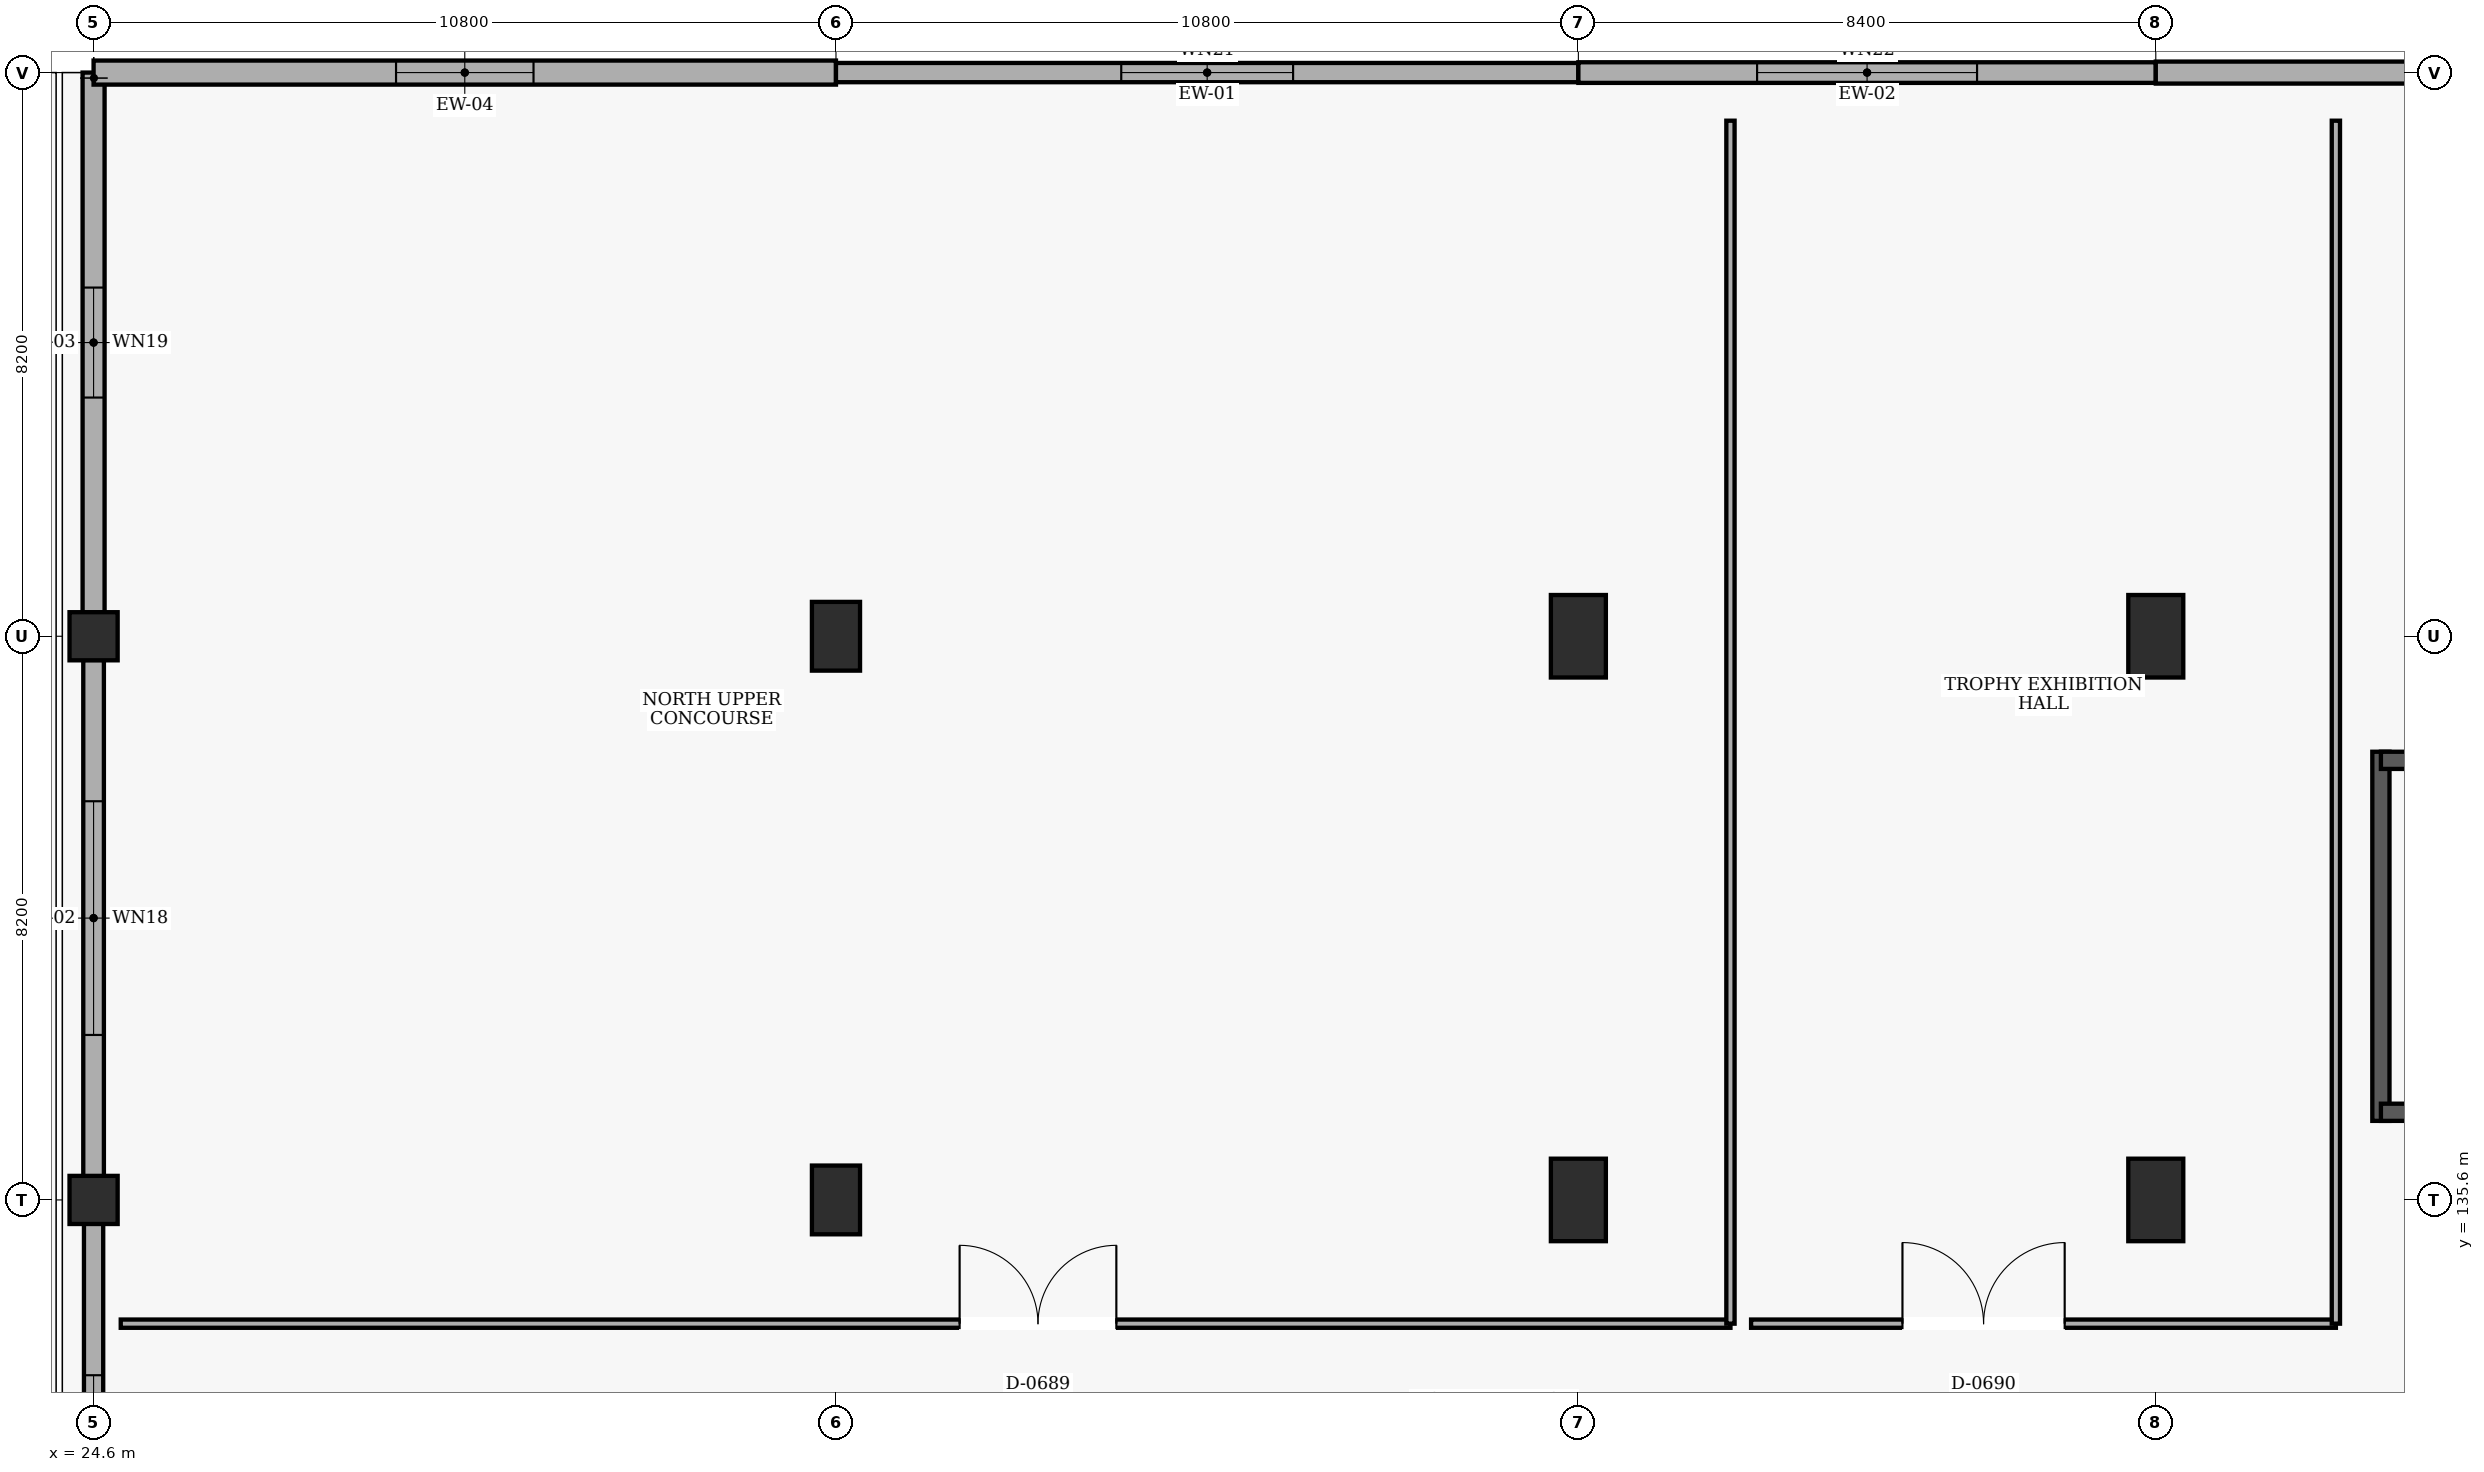
"""IFC4 building model, lengths in metres.
Left out: names, types, materials, properties, quantities, classifications, styles, units other than length and angle.
Written with IfcOpenShell. Run it as: python <this file> out.ifc"""

import sys

from ifc_helpers import new_model, si_unit, direction, frame, frame_2d, origin, origin_2d, place, context, subcontext, project, spatial, rectangle, extrude, element, fill, save


model = new_model("IFC4")
c1 = context("Model", 3, precision=1e-05, world=origin(), true_north=direction((0.0, 1.0)))
c2 = subcontext(c1, "Body", "Model", "MODEL_VIEW")
j1 = project(units=[si_unit("LENGTHUNIT", "METRE"), si_unit("PLANEANGLEUNIT", "RADIAN")], contexts=[c1])
p1 = place(None, origin())
s1 = spatial("IfcSite", under=j1, at=p1, CompositionType="ELEMENT")
p2 = place(p1, origin())
s2 = spatial("IfcBuilding", under=s1, at=p2, CompositionType="ELEMENT")
p3 = place(p2, frame((0.0, 0.0, 15.0)))
s3 = spatial("IfcBuildingStorey", under=s2, at=p3, CompositionType="ELEMENT", Elevation=15.0)
for number, where, z_axis, x_axis in (
    (1, (24.6, 135.6, 0.0), (0.0, 0.0, 1.0), (1.0, 0.0, 0.0)),
    (2, (24.6, 143.8, 0.0), (0.0, 0.0, 1.0), (1.0, 0.0, 0.0)),
):
    element("IfcColumn", number, at=place(p3, frame(where, z_axis=z_axis, x_axis=x_axis)), inside=s3, PredefinedType="COLUMN", context=c2, shape_type="SweptSolid", body=[
        extrude(rectangle(XDim=0.7, YDim=0.7, at=origin_2d()), origin(), (0.0, 0.0, 1.0), 4.8),
    ])
for number, where, z_axis, x_axis in (
    (3, (35.4, 135.6, 0.0), (0.0, 0.0, 1.0), (1.0, 0.0, 0.0)),
    (4, (35.4, 143.8, 0.0), (0.0, 0.0, 1.0), (1.0, 0.0, 0.0)),
):
    element("IfcColumn", number, at=place(p3, frame(where, z_axis=z_axis, x_axis=x_axis)), inside=s3, PredefinedType="COLUMN", context=c2, shape_type="SweptSolid", body=[
        extrude(rectangle(XDim=0.7, YDim=1.0, at=origin_2d()), origin(), (0.0, 0.0, 1.0), 4.8),
    ])
for number, where, z_axis, x_axis in (
    (5, (46.2, 135.6, 0.0), (0.0, 0.0, 1.0), (1.0, 0.0, 0.0)),
    (6, (46.2, 143.8, 0.0), (0.0, 0.0, 1.0), (1.0, 0.0, 0.0)),
    (7, (54.6, 135.6, 0.0), (0.0, 0.0, 1.0), (1.0, 0.0, 0.0)),
    (8, (54.6, 143.8, 0.0), (0.0, 0.0, 1.0), (1.0, 0.0, 0.0)),
):
    element("IfcColumn", number, at=place(p3, frame(where, z_axis=z_axis, x_axis=x_axis)), inside=s3, PredefinedType="COLUMN", context=c2, shape_type="SweptSolid", body=[
        extrude(rectangle(XDim=0.8, YDim=1.2, at=origin_2d()), origin(), (0.0, 0.0, 1.0), 4.8),
    ])
p4 = place(p3, frame((24.6, 127.845, 0.0), z_axis=(0.0, 0.0, 1.0), x_axis=(0.0, 1.0, 0.0)))
e9 = element("IfcWall", 9, at=p4, inside=s3, PredefinedType="SOLIDWALL", context=c2, shape_type="SweptSolid", body=[
    extrude(rectangle(XDim=7.41, YDim=0.28, at=frame_2d((3.705, 0.0))), origin(), (0.0, 0.0, 1.0), 3.82),
])
p5 = place(p4, frame((2.205, 0.0, 0.9)))
e10 = element("IfcOpeningElement", 10, at=p5, cuts=e9, PredefinedType="OPENING", context=c2, shape_type="SweptSolid", body=[
    extrude(rectangle(XDim=3.0, YDim=2.1, at=frame_2d((1.5, 1.05))), frame((0.0, 0.15, 0.0), z_axis=(0.0, -1.0, 0.0), x_axis=(1.0, 0.0, 0.0)), (0.0, 0.0, 1.0), 0.3),
])
p6 = place(p3, frame((24.6, 135.945, 0.0), z_axis=(0.0, 0.0, 1.0), x_axis=(0.0, 1.0, 0.0)))
e11 = element("IfcWall", 11, at=p6, inside=s3, PredefinedType="SOLIDWALL", context=c2, shape_type="SweptSolid", body=[
    extrude(rectangle(XDim=7.51, YDim=0.3, at=frame_2d((3.755, 0.0))), origin(), (0.0, 0.0, 1.0), 3.82),
])
p7 = place(p6, frame((2.055, 0.0, 0.9)))
e12 = element("IfcOpeningElement", 12, at=p7, cuts=e11, PredefinedType="OPENING", context=c2, shape_type="SweptSolid", body=[
    extrude(rectangle(XDim=3.4, YDim=2.1, at=frame_2d((1.7, 1.05))), frame((0.0, 0.16, 0.0), z_axis=(0.0, -1.0, 0.0), x_axis=(1.0, 0.0, 0.0)), (0.0, 0.0, 1.0), 0.32),
])
p8 = place(p3, frame((24.6, 144.145, 0.0), z_axis=(0.0, 0.0, 1.0), x_axis=(0.0, 1.0, 0.0)))
e13 = element("IfcWall", 13, at=p8, inside=s3, PredefinedType="SOLIDWALL", context=c2, shape_type="SweptSolid", body=[
    extrude(rectangle(XDim=7.855, YDim=0.32, at=frame_2d((3.927, 0.0))), origin(), (0.0, 0.0, 1.0), 4.48),
])
p9 = place(p8, frame((3.127, 0.0, 0.9)))
e14 = element("IfcOpeningElement", 14, at=p9, cuts=e13, PredefinedType="OPENING", context=c2, shape_type="SweptSolid", body=[
    extrude(rectangle(XDim=1.6, YDim=2.4, at=frame_2d((0.8, 1.2))), frame((0.0, 0.17, 0.0), z_axis=(0.0, -1.0, 0.0), x_axis=(1.0, 0.0, 0.0)), (0.0, 0.0, 1.0), 0.34),
])
p10 = place(p3, frame((24.6, 152.0, 0.0), z_axis=(0.0, 0.0, 1.0), x_axis=(1.0, 0.0, 0.0)))
e15 = element("IfcWall", 15, at=p10, inside=s3, PredefinedType="SOLIDWALL", context=c2, shape_type="SweptSolid", body=[
    extrude(rectangle(XDim=10.8, YDim=0.35, at=frame_2d((5.4, 0.0))), origin(), (0.0, 0.0, 1.0), 4.48),
])
p11 = place(p10, frame((4.4, 0.0, 0.9)))
e16 = element("IfcOpeningElement", 16, at=p11, cuts=e15, PredefinedType="OPENING", context=c2, shape_type="SweptSolid", body=[
    extrude(rectangle(XDim=2.0, YDim=2.4, at=frame_2d((1.0, 1.2))), frame((0.0, 0.185, 0.0), z_axis=(0.0, -1.0, 0.0), x_axis=(1.0, 0.0, 0.0)), (0.0, 0.0, 1.0), 0.37),
])
p12 = place(p3, frame((35.4, 152.0, 0.0), z_axis=(0.0, 0.0, 1.0), x_axis=(1.0, 0.0, 0.0)))
e17 = element("IfcWall", 17, at=p12, inside=s3, PredefinedType="SOLIDWALL", context=c2, shape_type="SweptSolid", body=[
    extrude(rectangle(XDim=10.8, YDim=0.28, at=frame_2d((5.4, 0.0))), origin(), (0.0, 0.0, 1.0), 4.48),
])
p13 = place(p12, frame((4.15, 0.0, 0.9)))
e18 = element("IfcOpeningElement", 18, at=p13, cuts=e17, PredefinedType="OPENING", context=c2, shape_type="SweptSolid", body=[
    extrude(rectangle(XDim=2.5, YDim=2.4, at=frame_2d((1.25, 1.2))), frame((0.0, 0.15, 0.0), z_axis=(0.0, -1.0, 0.0), x_axis=(1.0, 0.0, 0.0)), (0.0, 0.0, 1.0), 0.3),
])
p14 = place(p3, frame((46.2, 152.0, 0.0), z_axis=(0.0, 0.0, 1.0), x_axis=(1.0, 0.0, 0.0)))
e19 = element("IfcWall", 19, at=p14, inside=s3, PredefinedType="SOLIDWALL", context=c2, shape_type="SweptSolid", body=[
    extrude(rectangle(XDim=8.4, YDim=0.3, at=frame_2d((4.2, 0.0))), origin(), (0.0, 0.0, 1.0), 4.48),
])
p15 = place(p14, frame((2.6, 0.0, 0.9)))
e20 = element("IfcOpeningElement", 20, at=p15, cuts=e19, PredefinedType="OPENING", context=c2, shape_type="SweptSolid", body=[
    extrude(rectangle(XDim=3.2, YDim=2.4, at=frame_2d((1.6, 1.2))), frame((0.0, 0.16, 0.0), z_axis=(0.0, -1.0, 0.0), x_axis=(1.0, 0.0, 0.0)), (0.0, 0.0, 1.0), 0.32),
])
p16 = place(p3, frame((54.6, 152.0, 0.0), z_axis=(0.0, 0.0, 1.0), x_axis=(1.0, 0.0, 0.0)))
e21 = element("IfcWall", 21, at=p16, inside=s3, PredefinedType="SOLIDWALL", context=c2, shape_type="SweptSolid", body=[
    extrude(rectangle(XDim=9.0, YDim=0.32, at=frame_2d((4.5, 0.0))), origin(), (0.0, 0.0, 1.0), 4.48),
])
p17 = place(p16, frame((3.9, 0.0, 0.9)))
e22 = element("IfcOpeningElement", 22, at=p17, cuts=e21, PredefinedType="OPENING", context=c2, shape_type="SweptSolid", body=[
    extrude(rectangle(XDim=1.2, YDim=1.5, at=frame_2d((0.6, 0.75))), frame((0.0, 0.17, 0.0), z_axis=(0.0, -1.0, 0.0), x_axis=(1.0, 0.0, 0.0)), (0.0, 0.0, 1.0), 0.34),
])
p18 = place(p3, frame((57.875, 142.12, 0.0), z_axis=(0.0, 0.0, 1.0), x_axis=(0.0, -1.0, 0.0)))
e23 = element("IfcWall", 23, at=p18, inside=s3, PredefinedType="SHEAR", context=c2, shape_type="SweptSolid", body=[
    extrude(rectangle(XDim=5.37, YDim=0.25, at=frame_2d((2.685, 0.0))), origin(), (0.0, 0.0, 1.0), 4.5),
])
p19 = place(p3, frame((57.875, 141.995, 0.0), z_axis=(0.0, 0.0, 1.0), x_axis=(1.0, 0.0, 0.0)))
e24 = element("IfcWall", 24, at=p19, inside=s3, PredefinedType="SHEAR", context=c2, shape_type="SweptSolid", body=[
    extrude(rectangle(XDim=10.85, YDim=0.25, at=frame_2d((5.425, 0.0))), origin(), (0.0, 0.0, 1.0), 4.5),
])
p20 = place(p3, frame((57.875, 136.875, 0.0), z_axis=(0.0, 0.0, 1.0), x_axis=(1.0, 0.0, 0.0)))
e25 = element("IfcWall", 25, at=p20, inside=s3, PredefinedType="SHEAR", context=c2, shape_type="SweptSolid", body=[
    extrude(rectangle(XDim=10.85, YDim=0.25, at=frame_2d((5.425, 0.0))), origin(), (0.0, 0.0, 1.0), 4.5),
])
p21 = place(p20, frame((0.52, 0.0, 0.0)))
e26 = element("IfcOpeningElement", 26, at=p21, cuts=e25, PredefinedType="OPENING", context=c2, shape_type="SweptSolid", body=[
    extrude(rectangle(XDim=1.4, YDim=2.15, at=frame_2d((0.7, 1.075))), frame((0.0, 0.135, 0.0), z_axis=(0.0, -1.0, 0.0), x_axis=(1.0, 0.0, 0.0)), (0.0, 0.0, 1.0), 0.27),
])
p22 = place(p3, frame((24.995, 133.8, 0.0), z_axis=(0.0, 0.0, 1.0), x_axis=(1.0, 0.0, 0.0)))
e27 = element("IfcWall", 27, at=p22, inside=s3, PredefinedType="PARTITIONING", context=c2, shape_type="SweptSolid", body=[
    extrude(rectangle(XDim=23.417, YDim=0.12, at=frame_2d((11.709, 0.0))), origin(), (0.0, 0.0, 1.0), 4.5),
])
p23 = place(p22, frame((12.204, 0.0, 0.0)))
e28 = element("IfcOpeningElement", 28, at=p23, cuts=e27, PredefinedType="OPENING", context=c2, shape_type="SweptSolid", body=[
    extrude(rectangle(XDim=2.28, YDim=2.4, at=frame_2d((1.14, 1.2))), frame((0.0, 0.07, 0.0), z_axis=(0.0, -1.0, 0.0), x_axis=(1.0, 0.0, 0.0)), (0.0, 0.0, 1.0), 0.14),
])
p24 = place(p3, frame((48.413, 133.8, 0.0), z_axis=(0.0, 0.0, 1.0), x_axis=(0.0, 1.0, 0.0)))
e29 = element("IfcWall", 29, at=p24, inside=s3, PredefinedType="PARTITIONING", context=c2, shape_type="SweptSolid", body=[
    extrude(rectangle(XDim=17.5, YDim=0.12, at=frame_2d((8.75, 0.0))), origin(), (0.0, 0.0, 1.0), 4.5),
])
p25 = place(p3, frame((48.712, 133.8, 0.0), z_axis=(0.0, 0.0, 1.0), x_axis=(1.0, 0.0, 0.0)))
e30 = element("IfcWall", 30, at=p25, inside=s3, PredefinedType="PARTITIONING", context=c2, shape_type="SweptSolid", body=[
    extrude(rectangle(XDim=8.508, YDim=0.12, at=frame_2d((4.254, 0.0))), origin(), (0.0, 0.0, 1.0), 4.5),
])
p26 = place(p25, frame((2.202, 0.0, 0.0)))
e31 = element("IfcOpeningElement", 31, at=p26, cuts=e30, PredefinedType="OPENING", context=c2, shape_type="SweptSolid", body=[
    extrude(rectangle(XDim=2.36, YDim=2.4, at=frame_2d((1.18, 1.2))), frame((0.0, 0.07, 0.0), z_axis=(0.0, -1.0, 0.0), x_axis=(1.0, 0.0, 0.0)), (0.0, 0.0, 1.0), 0.14),
])
p27 = place(p3, frame((57.22, 133.8, 0.0), z_axis=(0.0, 0.0, 1.0), x_axis=(0.0, 1.0, 0.0)))
e32 = element("IfcWall", 32, at=p27, inside=s3, PredefinedType="PARTITIONING", context=c2, shape_type="SweptSolid", body=[
    extrude(rectangle(XDim=17.5, YDim=0.12, at=frame_2d((8.75, 0.0))), origin(), (0.0, 0.0, 1.0), 4.5),
])
p28 = place(p5, origin())
e33 = element("IfcWindow", 33, at=p28, inside=s3, PartitioningType="SINGLE_PANEL", PredefinedType="WINDOW", context=c2, shape_type="SweptSolid", body=[
    extrude(rectangle(XDim=3.0, YDim=2.1, at=frame_2d((1.5, 1.05))), frame((0.0, 0.03, 0.0), z_axis=(0.0, -1.0, 0.0), x_axis=(1.0, 0.0, 0.0)), (0.0, 0.0, 1.0), 0.06),
])
fill(e10, e33)
p29 = place(p7, origin())
e34 = element("IfcWindow", 34, at=p29, inside=s3, PartitioningType="SINGLE_PANEL", PredefinedType="WINDOW", context=c2, shape_type="SweptSolid", body=[
    extrude(rectangle(XDim=3.4, YDim=2.1, at=frame_2d((1.7, 1.05))), frame((0.0, 0.03, 0.0), z_axis=(0.0, -1.0, 0.0), x_axis=(1.0, 0.0, 0.0)), (0.0, 0.0, 1.0), 0.06),
])
fill(e12, e34)
p30 = place(p9, origin())
e35 = element("IfcWindow", 35, at=p30, inside=s3, PartitioningType="SINGLE_PANEL", PredefinedType="WINDOW", context=c2, shape_type="SweptSolid", body=[
    extrude(rectangle(XDim=1.6, YDim=2.4, at=frame_2d((0.8, 1.2))), frame((0.0, 0.03, 0.0), z_axis=(0.0, -1.0, 0.0), x_axis=(1.0, 0.0, 0.0)), (0.0, 0.0, 1.0), 0.06),
])
fill(e14, e35)
p31 = place(p11, origin())
e36 = element("IfcWindow", 36, at=p31, inside=s3, PartitioningType="SINGLE_PANEL", PredefinedType="WINDOW", context=c2, shape_type="SweptSolid", body=[
    extrude(rectangle(XDim=2.0, YDim=2.4, at=frame_2d((1.0, 1.2))), frame((0.0, 0.03, 0.0), z_axis=(0.0, -1.0, 0.0), x_axis=(1.0, 0.0, 0.0)), (0.0, 0.0, 1.0), 0.06),
])
fill(e16, e36)
p32 = place(p13, origin())
e37 = element("IfcWindow", 37, at=p32, inside=s3, PartitioningType="SINGLE_PANEL", PredefinedType="WINDOW", context=c2, shape_type="SweptSolid", body=[
    extrude(rectangle(XDim=2.5, YDim=2.4, at=frame_2d((1.25, 1.2))), frame((0.0, 0.03, 0.0), z_axis=(0.0, -1.0, 0.0), x_axis=(1.0, 0.0, 0.0)), (0.0, 0.0, 1.0), 0.06),
])
fill(e18, e37)
p33 = place(p15, origin())
e38 = element("IfcWindow", 38, at=p33, inside=s3, PartitioningType="SINGLE_PANEL", PredefinedType="WINDOW", context=c2, shape_type="SweptSolid", body=[
    extrude(rectangle(XDim=3.2, YDim=2.4, at=frame_2d((1.6, 1.2))), frame((0.0, 0.03, 0.0), z_axis=(0.0, -1.0, 0.0), x_axis=(1.0, 0.0, 0.0)), (0.0, 0.0, 1.0), 0.06),
])
fill(e20, e38)
p34 = place(p23, origin())
e39 = element("IfcDoor", 39, at=p34, inside=s3, OperationType="DOUBLE_DOOR_SINGLE_SWING", PredefinedType="DOOR", context=c2, shape_type="SweptSolid", body=[
    extrude(rectangle(XDim=2.28, YDim=2.4, at=frame_2d((1.14, 1.2))), frame((0.0, 0.025, 0.0), z_axis=(0.0, -1.0, 0.0), x_axis=(1.0, 0.0, 0.0)), (0.0, 0.0, 1.0), 0.05),
])
fill(e28, e39)
p35 = place(p26, origin())
e40 = element("IfcDoor", 40, at=p35, inside=s3, OperationType="DOUBLE_DOOR_SINGLE_SWING", PredefinedType="DOOR", context=c2, shape_type="SweptSolid", body=[
    extrude(rectangle(XDim=2.36, YDim=2.4, at=frame_2d((1.18, 1.2))), frame((0.0, 0.025, 0.0), z_axis=(0.0, -1.0, 0.0), x_axis=(1.0, 0.0, 0.0)), (0.0, 0.0, 1.0), 0.05),
])
fill(e31, e40)
save(model, sys.argv[1])
